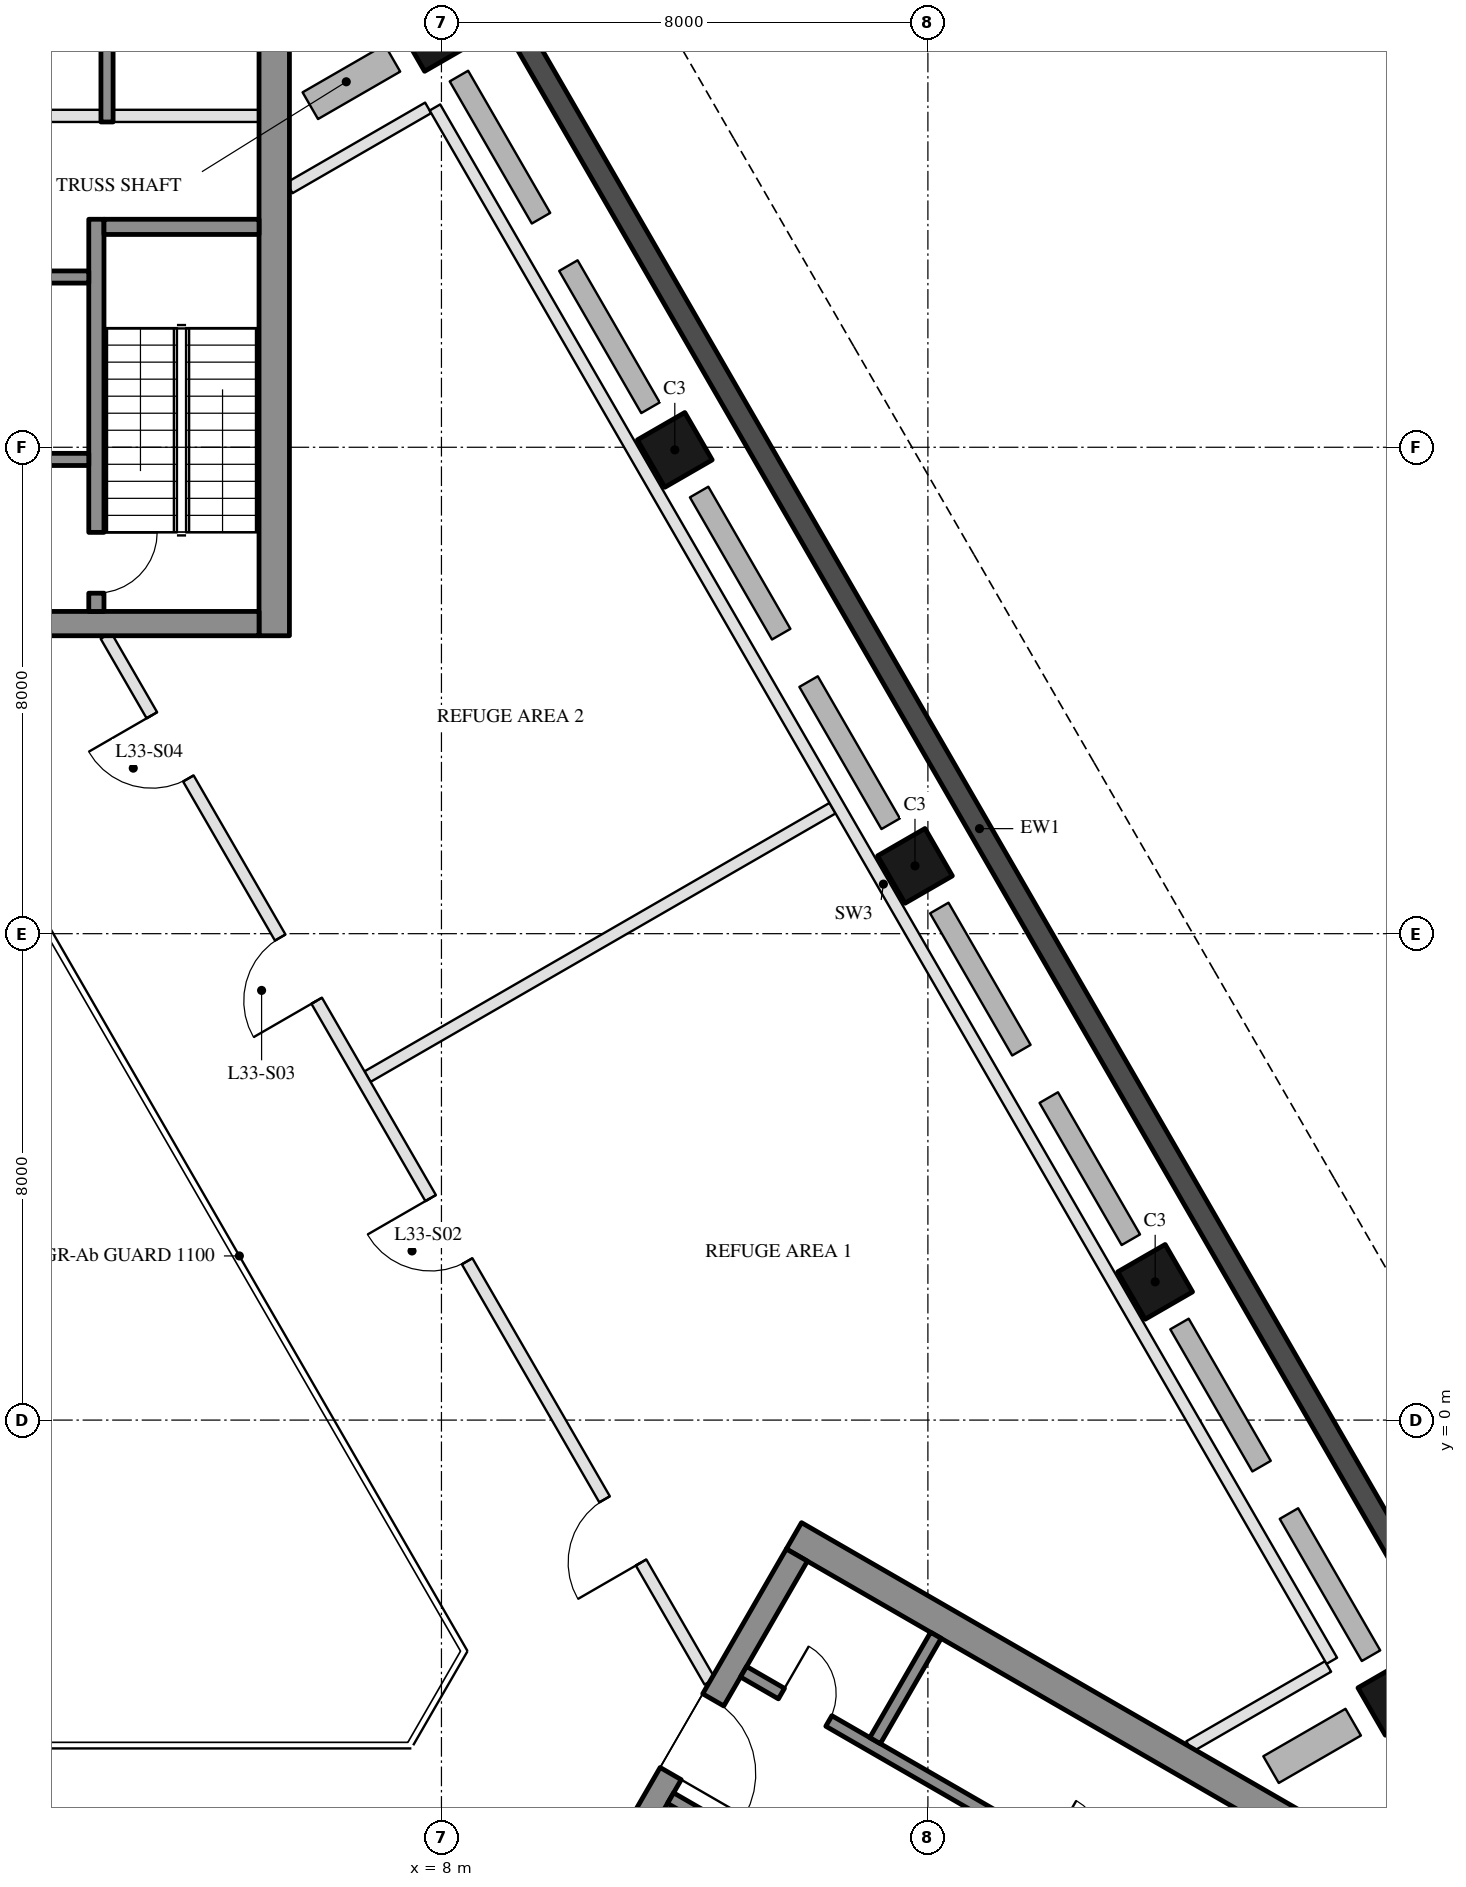
"""IFC4 building model, lengths in metres.
Left out: names, types, materials, properties, quantities, classifications, styles, units other than length and angle.
Written with IfcOpenShell. Run it as: python <this file> out.ifc"""

import sys

from ifc_helpers import new_model, si_unit, direction, frame, frame_2d, origin, origin_2d, place, context, subcontext, project, spatial, rectangle, hollow_rectangle, extrude, element, fill, save


model = new_model("IFC4")
c1 = context("Model", 3, precision=1e-05, world=origin(), true_north=direction((0.0, 1.0)))
c2 = subcontext(c1, "Body", "Model", "MODEL_VIEW")
j1 = project(units=[si_unit("LENGTHUNIT", "METRE"), si_unit("PLANEANGLEUNIT", "RADIAN")], contexts=[c1])
p1 = place(None, origin())
s1 = spatial("IfcSite", under=j1, at=p1, CompositionType="ELEMENT")
p2 = place(p1, origin())
s2 = spatial("IfcBuilding", under=s1, at=p2, CompositionType="ELEMENT")
p3 = place(p2, frame((0.0, 0.0, 142.1)))
s3 = spatial("IfcBuildingStorey", under=s2, at=p3, CompositionType="ELEMENT", Elevation=142.1)
for number, where, z_axis, x_axis in (
    (1, (23.688, -4.568, 0.0), (0.0, 0.0, 1.0), (-0.5, 0.866, 0.0)),
    (2, (19.738, 2.273, 0.0), (0.0, 0.0, 1.0), (-0.5, 0.866, 0.0)),
    (3, (15.788, 9.115, 0.0), (0.0, 0.0, 1.0), (-0.5, 0.866, 0.0)),
    (4, (11.838, 15.957, 0.0), (0.0, 0.0, 1.0), (-0.5, 0.866, 0.0)),
    (5, (7.888, 22.798, 0.0), (0.0, 0.0, 1.0), (-0.5, 0.866, 0.0)),
):
    element("IfcColumn", number, at=place(p3, frame(where, z_axis=z_axis, x_axis=x_axis)), inside=s3, PredefinedType="COLUMN", context=c2, shape_type="SweptSolid", body=[
        extrude(hollow_rectangle(XDim=0.9, YDim=0.9, WallThickness=0.04, at=origin_2d()), origin(), (0.0, 0.0, 1.0), 4.5),
    ])
p4 = place(p3, frame((26.256, -6.567, 0.0), z_axis=(0.0, 0.0, 1.0), x_axis=(-0.499998380999, 0.866026338513, 0.0)))
e6 = element("IfcWall", 6, at=p4, inside=s3, PredefinedType="SOLIDWALL", context=c2, shape_type="SweptSolid", body=[
    extrude(rectangle(XDim=37.631, YDim=0.35, at=frame_2d((18.816, 0.0))), origin(), (0.0, 0.0, 1.0), 4.35),
])
p5 = place(p3, frame((5.25, 12.9, 0.0), z_axis=(0.0, 0.0, 1.0), x_axis=(0.0, 1.0, 0.0)))
e7 = element("IfcWall", 7, at=p5, inside=s3, PredefinedType="SHEAR", context=c2, shape_type="SweptSolid", body=[
    extrude(rectangle(XDim=14.837, YDim=0.5, at=frame_2d((7.418, 0.0))), origin(), (0.0, 0.0, 1.0), 4.3),
])
p6 = place(p3, frame((5.0, 13.1, 0.0), z_axis=(0.0, 0.0, 1.0), x_axis=(-1.0, 0.0, 0.0)))
e8 = element("IfcWall", 8, at=p6, inside=s3, PredefinedType="SHEAR", context=c2, shape_type="SweptSolid", body=[
    extrude(rectangle(XDim=10.0, YDim=0.4, at=frame_2d((5.0, 0.0))), origin(), (0.0, 0.0, 1.0), 4.3),
])
p7 = place(p6, frame((3.55, 0.0, 0.0)))
e9 = element("IfcOpeningElement", 9, at=p7, cuts=e8, PredefinedType="OPENING", context=c2, shape_type="SweptSolid", body=[
    extrude(rectangle(XDim=1.1, YDim=2.1, at=frame_2d((0.55, 1.05))), frame((0.0, 0.21, 0.0), z_axis=(0.0, -1.0, 0.0), x_axis=(1.0, 0.0, 0.0)), (0.0, 0.0, 1.0), 0.42),
])
p8 = place(p6, frame((5.85, 0.0, 0.0)))
e10 = element("IfcOpeningElement", 10, at=p8, cuts=e8, PredefinedType="OPENING", context=c2, shape_type="SweptSolid", body=[
    extrude(rectangle(XDim=1.4, YDim=2.1, at=frame_2d((0.7, 1.05))), frame((0.0, 0.21, 0.0), z_axis=(0.0, -1.0, 0.0), x_axis=(1.0, 0.0, 0.0)), (0.0, 0.0, 1.0), 0.42),
])
p9 = place(p3, frame((2.325, 13.3, 0.0), z_axis=(0.0, 0.0, 1.0), x_axis=(0.0, 1.0, 0.0)))
e11 = element("IfcWall", 11, at=p9, inside=s3, PredefinedType="SHEAR", context=c2, shape_type="SweptSolid", body=[
    extrude(rectangle(XDim=6.45, YDim=0.25, at=frame_2d((3.225, 0.0))), origin(), (0.0, 0.0, 1.0), 4.3),
])
p10 = place(p9, frame((0.3, 0.0, 0.0)))
e12 = element("IfcOpeningElement", 12, at=p10, cuts=e11, PredefinedType="OPENING", context=c2, shape_type="SweptSolid", body=[
    extrude(rectangle(XDim=1.0, YDim=2.1, at=frame_2d((0.5, 1.05))), frame((0.0, 0.135, 0.0), z_axis=(0.0, -1.0, 0.0), x_axis=(1.0, 0.0, 0.0)), (0.0, 0.0, 1.0), 0.27),
])
p11 = place(p3, frame((5.0, 19.625, 0.0), z_axis=(0.0, 0.0, 1.0), x_axis=(-1.0, 0.0, 0.0)))
e13 = element("IfcWall", 13, at=p11, inside=s3, PredefinedType="SHEAR", context=c2, shape_type="SweptSolid", body=[
    extrude(rectangle(XDim=2.55, YDim=0.25, at=frame_2d((1.275, 0.0))), origin(), (0.0, 0.0, 1.0), 4.3),
])
p12 = place(p3, frame((2.2, 18.8, 0.0), z_axis=(0.0, 0.0, 1.0), x_axis=(-1.0, 0.0, 0.0)))
e14 = element("IfcWall", 14, at=p12, inside=s3, PredefinedType="SHEAR", context=c2, shape_type="SweptSolid", body=[
    extrude(rectangle(XDim=2.8, YDim=0.2, at=frame_2d((1.4, 0.0))), origin(), (0.0, 0.0, 1.0), 4.3),
])
p13 = place(p3, frame((2.2, 15.8, 0.0), z_axis=(0.0, 0.0, 1.0), x_axis=(-1.0, 0.0, 0.0)))
e15 = element("IfcWall", 15, at=p13, inside=s3, PredefinedType="SHEAR", context=c2, shape_type="SweptSolid", body=[
    extrude(rectangle(XDim=2.8, YDim=0.2, at=frame_2d((1.4, 0.0))), origin(), (0.0, 0.0, 1.0), 4.3),
])
p14 = place(p13, frame((0.7, 0.0, 0.0)))
e16 = element("IfcOpeningElement", 16, at=p14, cuts=e15, PredefinedType="OPENING", context=c2, shape_type="SweptSolid", body=[
    extrude(rectangle(XDim=1.2, YDim=2.1, at=frame_2d((0.6, 1.05))), frame((0.0, 0.11, 0.0), z_axis=(0.0, -1.0, 0.0), x_axis=(1.0, 0.0, 0.0)), (0.0, 0.0, 1.0), 0.22),
])
p15 = place(p3, frame((2.5, 21.35, 0.0), z_axis=(0.0, 0.0, 1.0), x_axis=(0.0, 1.0, 0.0)))
e17 = element("IfcWall", 17, at=p15, inside=s3, PredefinedType="SHEAR", context=c2, shape_type="SweptSolid", body=[
    extrude(rectangle(XDim=2.8, YDim=0.2, at=frame_2d((1.4, 0.0))), origin(), (0.0, 0.0, 1.0), 4.3),
])
p16 = place(p3, frame((5.0, 21.45, 0.0), z_axis=(0.0, 0.0, 1.0), x_axis=(-1.0, 0.0, 0.0)))
e18 = element("IfcWall", 18, at=p16, inside=s3, PredefinedType="PARTITIONING", context=c2, shape_type="SweptSolid", body=[
    extrude(rectangle(XDim=2.4, YDim=0.2, at=frame_2d((1.2, 0.0))), origin(), (0.0, 0.0, 1.0), 4.3),
])
p17 = place(p3, frame((2.4, 21.45, 0.0), z_axis=(0.0, 0.0, 1.0), x_axis=(-1.0, 0.0, 0.0)))
e19 = element("IfcWall", 19, at=p17, inside=s3, PredefinedType="PARTITIONING", context=c2, shape_type="SweptSolid", body=[
    extrude(rectangle(XDim=2.8, YDim=0.2, at=frame_2d((1.4, 0.0))), origin(), (0.0, 0.0, 1.0), 4.3),
])
p18 = place(p3, frame((13.797, -1.903, 0.0), z_axis=(0.0, 0.0, 1.0), x_axis=(0.866025009528, -0.500000682871, 0.0)))
e20 = element("IfcWall", 20, at=p18, inside=s3, PredefinedType="SHEAR", context=c2, shape_type="SweptSolid", body=[
    extrude(rectangle(XDim=14.837, YDim=0.5, at=frame_2d((7.418, 0.0))), origin(), (0.0, 0.0, 1.0), 4.3),
])
p19 = place(p3, frame((8.845, -10.88, 0.0), z_axis=(0.0, 0.0, 1.0), x_axis=(0.500004234368, 0.866022959057, 0.0)))
e21 = element("IfcWall", 21, at=p19, inside=s3, PredefinedType="SHEAR", context=c2, shape_type="SweptSolid", body=[
    extrude(rectangle(XDim=10.0, YDim=0.4, at=frame_2d((5.0, 0.0))), origin(), (0.0, 0.0, 1.0), 4.3),
])
p20 = place(p19, frame((3.55, 0.0, 0.0)))
e22 = element("IfcOpeningElement", 22, at=p20, cuts=e21, PredefinedType="OPENING", context=c2, shape_type="SweptSolid", body=[
    extrude(rectangle(XDim=1.1, YDim=2.1, at=frame_2d((0.55, 1.05))), frame((0.0, 0.21, 0.0), z_axis=(0.0, -1.0, 0.0), x_axis=(1.0, 0.0, 0.0)), (0.0, 0.0, 1.0), 0.42),
])
p21 = place(p19, frame((5.85, 0.0, 0.0)))
e23 = element("IfcOpeningElement", 23, at=p21, cuts=e21, PredefinedType="OPENING", context=c2, shape_type="SweptSolid", body=[
    extrude(rectangle(XDim=1.4, YDim=2.1, at=frame_2d((0.7, 1.05))), frame((0.0, 0.21, 0.0), z_axis=(0.0, -1.0, 0.0), x_axis=(1.0, 0.0, 0.0)), (0.0, 0.0, 1.0), 0.42),
])
p22 = place(p3, frame((11.768, -6.217, 0.0), z_axis=(0.0, 0.0, 1.0), x_axis=(0.866050077142, -0.499957262057, 0.0)))
e24 = element("IfcWall", 24, at=p22, inside=s3, PredefinedType="SHEAR", context=c2, shape_type="SweptSolid", body=[
    extrude(rectangle(XDim=2.4, YDim=0.2, at=frame_2d((1.2, 0.0))), origin(), (0.0, 0.0, 1.0), 4.3),
])
p23 = place(p3, frame((12.968, -4.138, 0.0), z_axis=(0.0, 0.0, 1.0), x_axis=(0.866028328073, -0.49999493495, 0.0)))
e25 = element("IfcWall", 25, at=p23, inside=s3, PredefinedType="SHEAR", context=c2, shape_type="SweptSolid", body=[
    extrude(rectangle(XDim=10.16, YDim=0.2, at=frame_2d((5.08, 0.0))), origin(), (0.0, 0.0, 1.0), 4.3),
])
p24 = place(p23, frame((0.72, 0.0, 0.0)))
e26 = element("IfcOpeningElement", 26, at=p24, cuts=e25, PredefinedType="OPENING", context=c2, shape_type="SweptSolid", body=[
    extrude(rectangle(XDim=0.9, YDim=2.1, at=frame_2d((0.45, 1.05))), frame((0.0, 0.11, 0.0), z_axis=(0.0, -1.0, 0.0), x_axis=(1.0, 0.0, 0.0)), (0.0, 0.0, 1.0), 0.22),
])
p25 = place(p23, frame((5.8, 0.0, 0.0)))
e27 = element("IfcOpeningElement", 27, at=p25, cuts=e25, PredefinedType="OPENING", context=c2, shape_type="SweptSolid", body=[
    extrude(rectangle(XDim=0.9, YDim=2.1, at=frame_2d((0.45, 1.05))), frame((0.0, 0.11, 0.0), z_axis=(0.0, -1.0, 0.0), x_axis=(1.0, 0.0, 0.0)), (0.0, 0.0, 1.0), 0.22),
])
p26 = place(p3, frame((15.131, -5.272, 0.0), z_axis=(0.0, 0.0, 1.0), x_axis=(0.499972520799, 0.866041268327, 0.0)))
e28 = element("IfcWall", 28, at=p26, inside=s3, PredefinedType="SHEAR", context=c2, shape_type="SweptSolid", body=[
    extrude(rectangle(XDim=2.0, YDim=0.2, at=frame_2d((1.0, 0.0))), origin(), (0.0, 0.0, 1.0), 4.3),
])
p27 = place(p3, frame((22.581, -4.052, 0.0), z_axis=(0.0, 0.0, 1.0), x_axis=(-0.866038977738, -0.499976488486, 0.0)))
e29 = element("IfcWall", 29, at=p27, inside=s3, PredefinedType="PARTITIONING", context=c2, shape_type="SweptSolid", body=[
    extrude(rectangle(XDim=2.635, YDim=0.2, at=frame_2d((1.317, 0.0))), origin(), (0.0, 0.0, 1.0), 4.35),
])
p28 = place(p3, frame((14.431, 10.064, 0.0), z_axis=(0.0, 0.0, 1.0), x_axis=(-0.866022591837, -0.500004870404, 0.0)))
e30 = element("IfcWall", 30, at=p28, inside=s3, PredefinedType="PARTITIONING", context=c2, shape_type="SweptSolid", body=[
    extrude(rectangle(XDim=8.83, YDim=0.2, at=frame_2d((4.415, 0.0))), origin(), (0.0, 0.0, 1.0), 4.35),
])
p29 = place(p3, frame((7.781, 21.582, 0.0), z_axis=(0.0, 0.0, 1.0), x_axis=(-0.865998849027, -0.500045991369, 0.0)))
e31 = element("IfcWall", 31, at=p29, inside=s3, PredefinedType="PARTITIONING", context=c2, shape_type="SweptSolid", body=[
    extrude(rectangle(XDim=2.635, YDim=0.2, at=frame_2d((1.317, 0.0))), origin(), (0.0, 0.0, 1.0), 4.35),
])
p30 = place(p3, frame((22.643, -3.959, 0.0), z_axis=(0.0, 0.0, 1.0), x_axis=(-0.499998500593, 0.866026269466, 0.0)))
e32 = element("IfcWall", 32, at=p30, inside=s3, PredefinedType="PARTITIONING", context=c2, shape_type="SweptSolid", body=[
    extrude(rectangle(XDim=29.5, YDim=0.2, at=frame_2d((14.75, 0.0))), origin(), (0.0, 0.0, 1.0), 3.75),
])
p31 = place(p3, frame((12.413, -4.3, 0.0), z_axis=(0.0, 0.0, 1.0), x_axis=(-0.50000478328, 0.866022642139, 0.0)))
e33 = element("IfcWall", 33, at=p31, inside=s3, PredefinedType="PARTITIONING", context=c2, shape_type="SweptSolid", body=[
    extrude(rectangle(XDim=19.861, YDim=0.2, at=frame_2d((9.931, 0.0))), origin(), (0.0, 0.0, 1.0), 3.75),
])
p32 = place(p31, frame((2.26, 0.0, 0.0)))
e34 = element("IfcOpeningElement", 34, at=p32, cuts=e33, PredefinedType="OPENING", context=c2, shape_type="SweptSolid", body=[
    extrude(rectangle(XDim=1.2, YDim=2.1, at=frame_2d((0.6, 1.05))), frame((0.0, 0.11, 0.0), z_axis=(0.0, -1.0, 0.0), x_axis=(1.0, 0.0, 0.0)), (0.0, 0.0, 1.0), 0.22),
])
p33 = place(p31, frame((7.982, 0.0, 0.0)))
e35 = element("IfcOpeningElement", 35, at=p33, cuts=e33, PredefinedType="OPENING", context=c2, shape_type="SweptSolid", body=[
    extrude(rectangle(XDim=1.2, YDim=2.1, at=frame_2d((0.6, 1.05))), frame((0.0, 0.11, 0.0), z_axis=(0.0, -1.0, 0.0), x_axis=(1.0, 0.0, 0.0)), (0.0, 0.0, 1.0), 0.22),
])
p34 = place(p31, frame((12.929, 0.0, 0.0)))
e36 = element("IfcOpeningElement", 36, at=p34, cuts=e33, PredefinedType="OPENING", context=c2, shape_type="SweptSolid", body=[
    extrude(rectangle(XDim=1.2, YDim=2.1, at=frame_2d((0.6, 1.05))), frame((0.0, 0.11, 0.0), z_axis=(0.0, -1.0, 0.0), x_axis=(1.0, 0.0, 0.0)), (0.0, 0.0, 1.0), 0.22),
])
p35 = place(p31, frame((17.151, 0.0, 0.0)))
e37 = element("IfcOpeningElement", 37, at=p35, cuts=e33, PredefinedType="OPENING", context=c2, shape_type="SweptSolid", body=[
    extrude(rectangle(XDim=1.2, YDim=2.1, at=frame_2d((0.6, 1.05))), frame((0.0, 0.11, 0.0), z_axis=(0.0, -1.0, 0.0), x_axis=(1.0, 0.0, 0.0)), (0.0, 0.0, 1.0), 0.22),
])
p36 = place(p10, frame((1.0, 0.0, 0.0), z_axis=(0.0, 0.0, 1.0), x_axis=(-1.0, 0.0, 0.0)))
e38 = element("IfcDoor", 38, at=p36, inside=s3, OperationType="SINGLE_SWING_LEFT", PredefinedType="DOOR", context=c2, shape_type="SweptSolid", body=[
    extrude(rectangle(XDim=1.0, YDim=2.1, at=frame_2d((0.5, 1.05))), frame((0.0, 0.025, 0.0), z_axis=(0.0, -1.0, 0.0), x_axis=(1.0, 0.0, 0.0)), (0.0, 0.0, 1.0), 0.05),
])
fill(e12, e38)
p37 = place(p24, origin())
e39 = element("IfcDoor", 39, at=p37, inside=s3, OperationType="SINGLE_SWING_LEFT", PredefinedType="DOOR", context=c2, shape_type="SweptSolid", body=[
    extrude(rectangle(XDim=0.9, YDim=2.1, at=frame_2d((0.45, 1.05))), frame((0.0, 0.025, 0.0), z_axis=(0.0, -1.0, 0.0), x_axis=(1.0, 0.0, 0.0)), (0.0, 0.0, 1.0), 0.05),
])
fill(e26, e39)
p38 = place(p21, frame((1.4, 0.0, 0.0), z_axis=(0.0, 0.0, 1.0), x_axis=(-1.0, 0.0, 0.0)))
e40 = element("IfcDoor", 40, at=p38, inside=s3, OperationType="DOUBLE_DOOR_SINGLE_SWING", PredefinedType="DOOR", context=c2, shape_type="SweptSolid", body=[
    extrude(rectangle(XDim=1.4, YDim=2.1, at=frame_2d((0.7, 1.05))), frame((0.0, 0.025, 0.0), z_axis=(0.0, -1.0, 0.0), x_axis=(1.0, 0.0, 0.0)), (0.0, 0.0, 1.0), 0.05),
])
fill(e23, e40)
p39 = place(p32, origin())
e41 = element("IfcDoor", 41, at=p39, inside=s3, OperationType="SINGLE_SWING_LEFT", PredefinedType="DOOR", context=c2, shape_type="SweptSolid", body=[
    extrude(rectangle(XDim=1.2, YDim=2.1, at=frame_2d((0.6, 1.05))), frame((0.0, 0.025, 0.0), z_axis=(0.0, -1.0, 0.0), x_axis=(1.0, 0.0, 0.0)), (0.0, 0.0, 1.0), 0.05),
])
fill(e34, e41)
p40 = place(p33, origin())
e42 = element("IfcDoor", 42, at=p40, inside=s3, OperationType="SINGLE_SWING_RIGHT", PredefinedType="DOOR", context=c2, shape_type="SweptSolid", body=[
    extrude(rectangle(XDim=1.2, YDim=2.1, at=frame_2d((0.6, 1.05))), frame((0.0, 0.025, 0.0), z_axis=(0.0, -1.0, 0.0), x_axis=(1.0, 0.0, 0.0)), (0.0, 0.0, 1.0), 0.05),
])
fill(e35, e42)
p41 = place(p34, origin())
e43 = element("IfcDoor", 43, at=p41, inside=s3, OperationType="SINGLE_SWING_LEFT", PredefinedType="DOOR", context=c2, shape_type="SweptSolid", body=[
    extrude(rectangle(XDim=1.2, YDim=2.1, at=frame_2d((0.6, 1.05))), frame((0.0, 0.025, 0.0), z_axis=(0.0, -1.0, 0.0), x_axis=(1.0, 0.0, 0.0)), (0.0, 0.0, 1.0), 0.05),
])
fill(e36, e43)
p42 = place(p35, origin())
e44 = element("IfcDoor", 44, at=p42, inside=s3, OperationType="SINGLE_SWING_RIGHT", PredefinedType="DOOR", context=c2, shape_type="SweptSolid", body=[
    extrude(rectangle(XDim=1.2, YDim=2.1, at=frame_2d((0.6, 1.05))), frame((0.0, 0.025, 0.0), z_axis=(0.0, -1.0, 0.0), x_axis=(1.0, 0.0, 0.0)), (0.0, 0.0, 1.0), 0.05),
])
fill(e37, e44)
save(model, sys.argv[1])
